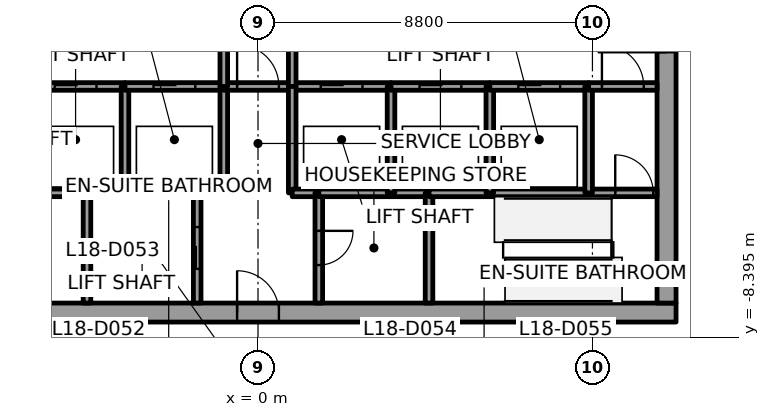
"""IFC4 building model, lengths in metres.
Left out: names, types, materials, properties, quantities, classifications, styles, units other than length and angle.
Written with IfcOpenShell. Run it as: python <this file> out.ifc"""

import sys

from ifc_helpers import new_model, si_unit, direction, frame, frame_2d, origin, place, context, subcontext, project, spatial, rectangle, extrude, element, fill, save


model = new_model("IFC4")
c1 = context("Model", 3, precision=1e-05, world=origin(), true_north=direction((0.0, 1.0)))
c2 = subcontext(c1, "Body", "Model", "MODEL_VIEW")
j1 = project(units=[si_unit("LENGTHUNIT", "METRE"), si_unit("PLANEANGLEUNIT", "RADIAN")], contexts=[c1])
p1 = place(None, origin())
s1 = spatial("IfcSite", under=j1, at=p1, CompositionType="ELEMENT")
p2 = place(p1, origin())
s2 = spatial("IfcBuilding", under=s1, at=p2, CompositionType="ELEMENT")
p3 = place(p2, frame((0.0, 0.0, 88.7)))
s3 = spatial("IfcBuildingStorey", under=s2, at=p3, CompositionType="ELEMENT", Elevation=88.7)
p4 = place(p3, frame((-11.0, -7.75, 0.0), z_axis=(0.0, 0.0, 1.0), x_axis=(1.0, 0.0, 0.0)))
e1 = element("IfcWall", 1, at=p4, inside=s3, PredefinedType="SHEAR", context=c2, shape_type="SweptSolid", body=[
    extrude(rectangle(XDim=22.0, YDim=0.5, at=frame_2d((11.0, 0.0))), origin(), (0.0, 0.0, 1.0), 3.7),
])
p5 = place(p4, frame((10.45, 0.0, 0.0)))
e2 = element("IfcOpeningElement", 2, at=p5, cuts=e1, PredefinedType="OPENING", context=c2, shape_type="SweptSolid", body=[
    extrude(rectangle(XDim=1.1, YDim=2.1, at=frame_2d((0.55, 1.05))), frame((0.0, 0.25, 0.0), z_axis=(0.0, -1.0, 0.0), x_axis=(1.0, 0.0, 0.0)), (0.0, 0.0, 1.0), 0.5),
])
p6 = place(p3, frame((10.75, -7.5, 0.0), z_axis=(0.0, 0.0, 1.0), x_axis=(0.0, 1.0, 0.0)))
e3 = element("IfcWall", 3, at=p6, inside=s3, PredefinedType="SHEAR", context=c2, shape_type="SweptSolid", body=[
    extrude(rectangle(XDim=15.0, YDim=0.5, at=frame_2d((7.5, 0.0))), origin(), (0.0, 0.0, 1.0), 3.7),
])
p7 = place(p6, frame((6.6, 0.0, 0.0)))
e4 = element("IfcOpeningElement", 4, at=p7, cuts=e3, PredefinedType="OPENING", context=c2, shape_type="SweptSolid", body=[
    extrude(rectangle(XDim=1.8, YDim=2.1, at=frame_2d((0.9, 1.05))), frame((0.0, 0.25, 0.0), z_axis=(0.0, -1.0, 0.0), x_axis=(1.0, 0.0, 0.0)), (0.0, 0.0, 1.0), 0.5),
])
p8 = place(p3, frame((-6.1, -4.6, 0.0), z_axis=(0.0, 0.0, 1.0), x_axis=(1.0, 0.0, 0.0)))
e5 = element("IfcWall", 5, at=p8, inside=s3, PredefinedType="SOLIDWALL", context=c2, shape_type="SweptSolid", body=[
    extrude(rectangle(XDim=1.6, YDim=0.2, at=frame_2d((0.8, 0.0))), origin(), (0.0, 0.0, 1.0), 3.55),
])
p9 = place(p3, frame((-6.1, -1.8, 0.0), z_axis=(0.0, 0.0, 1.0), x_axis=(1.0, 0.0, 0.0)))
e6 = element("IfcWall", 6, at=p9, inside=s3, PredefinedType="SOLIDWALL", context=c2, shape_type="SweptSolid", body=[
    extrude(rectangle(XDim=2.6, YDim=0.2, at=frame_2d((1.3, 0.0))), origin(), (0.0, 0.0, 1.0), 3.55),
])
p10 = place(p9, frame((0.75, 0.0, 0.0)))
e7 = element("IfcOpeningElement", 7, at=p10, cuts=e6, PredefinedType="OPENING", context=c2, shape_type="SweptSolid", body=[
    extrude(rectangle(XDim=1.1, YDim=2.1, at=frame_2d((0.55, 1.05))), frame((0.0, 0.1, 0.0), z_axis=(0.0, -1.0, 0.0), x_axis=(1.0, 0.0, 0.0)), (0.0, 0.0, 1.0), 0.2),
])
p11 = place(p3, frame((-4.5, -4.6, 0.0), z_axis=(0.0, 0.0, 1.0), x_axis=(0.0, -1.0, 0.0)))
e8 = element("IfcWall", 8, at=p11, inside=s3, PredefinedType="SOLIDWALL", context=c2, shape_type="SweptSolid", body=[
    extrude(rectangle(XDim=2.9, YDim=0.2, at=frame_2d((1.45, 0.0))), origin(), (0.0, 0.0, 1.0), 3.55),
])
p12 = place(p3, frame((-4.5, -4.6, 0.0), z_axis=(0.0, 0.0, 1.0), x_axis=(1.0, 0.0, 0.0)))
e9 = element("IfcWall", 9, at=p12, inside=s3, PredefinedType="SOLIDWALL", context=c2, shape_type="SweptSolid", body=[
    extrude(rectangle(XDim=1.0, YDim=0.2, at=frame_2d((0.5, 0.0))), origin(), (0.0, 0.0, 1.0), 3.55),
])
p13 = place(p3, frame((-3.5, -4.6, 0.0), z_axis=(0.0, 0.0, 1.0), x_axis=(1.0, 0.0, 0.0)))
e10 = element("IfcWall", 10, at=p13, inside=s3, PredefinedType="SOLIDWALL", context=c2, shape_type="SweptSolid", body=[
    extrude(rectangle(XDim=1.9, YDim=0.2, at=frame_2d((0.95, 0.0))), origin(), (0.0, 0.0, 1.0), 3.55),
])
p14 = place(p3, frame((-3.5, -4.6, 0.0), z_axis=(0.0, 0.0, 1.0), x_axis=(0.0, 1.0, 0.0)))
e11 = element("IfcWall", 11, at=p14, inside=s3, PredefinedType="SOLIDWALL", context=c2, shape_type="SweptSolid", body=[
    extrude(rectangle(XDim=2.8, YDim=0.2, at=frame_2d((1.4, 0.0))), origin(), (0.0, 0.0, 1.0), 3.55),
])
p15 = place(p3, frame((-3.5, -1.8, 0.0), z_axis=(0.0, 0.0, 1.0), x_axis=(1.0, 0.0, 0.0)))
e12 = element("IfcWall", 12, at=p15, inside=s3, PredefinedType="SOLIDWALL", context=c2, shape_type="SweptSolid", body=[
    extrude(rectangle(XDim=2.6, YDim=0.2, at=frame_2d((1.3, 0.0))), origin(), (0.0, 0.0, 1.0), 3.55),
])
p16 = place(p15, frame((0.75, 0.0, 0.0)))
e13 = element("IfcOpeningElement", 13, at=p16, cuts=e12, PredefinedType="OPENING", context=c2, shape_type="SweptSolid", body=[
    extrude(rectangle(XDim=1.1, YDim=2.1, at=frame_2d((0.55, 1.05))), frame((0.0, 0.1, 0.0), z_axis=(0.0, -1.0, 0.0), x_axis=(1.0, 0.0, 0.0)), (0.0, 0.0, 1.0), 0.2),
])
p17 = place(p3, frame((-1.6, -7.5, 0.0), z_axis=(0.0, 0.0, 1.0), x_axis=(0.0, 1.0, 0.0)))
e14 = element("IfcWall", 14, at=p17, inside=s3, PredefinedType="SOLIDWALL", context=c2, shape_type="SweptSolid", body=[
    extrude(rectangle(XDim=2.9, YDim=0.2, at=frame_2d((1.45, 0.0))), origin(), (0.0, 0.0, 1.0), 3.55),
])
p18 = place(p17, frame((0.9, 0.0, 0.0)))
e15 = element("IfcOpeningElement", 15, at=p18, cuts=e14, PredefinedType="OPENING", context=c2, shape_type="SweptSolid", body=[
    extrude(rectangle(XDim=1.1, YDim=2.1, at=frame_2d((0.55, 1.05))), frame((0.0, 0.1, 0.0), z_axis=(0.0, -1.0, 0.0), x_axis=(1.0, 0.0, 0.0)), (0.0, 0.0, 1.0), 0.2),
])
p19 = place(p3, frame((-1.6, -4.6, 0.0), z_axis=(0.0, 0.0, 1.0), x_axis=(1.0, 0.0, 0.0)))
e16 = element("IfcWall", 16, at=p19, inside=s3, PredefinedType="SOLIDWALL", context=c2, shape_type="SweptSolid", body=[
    extrude(rectangle(XDim=0.7, YDim=0.2, at=frame_2d((0.35, 0.0))), origin(), (0.0, 0.0, 1.0), 3.55),
])
p20 = place(p3, frame((-0.9, -4.6, 0.0), z_axis=(0.0, 0.0, 1.0), x_axis=(0.0, 1.0, 0.0)))
e17 = element("IfcWall", 17, at=p20, inside=s3, PredefinedType="SOLIDWALL", context=c2, shape_type="SweptSolid", body=[
    extrude(rectangle(XDim=2.8, YDim=0.2, at=frame_2d((1.4, 0.0))), origin(), (0.0, 0.0, 1.0), 3.55),
])
p21 = place(p3, frame((-0.9, -1.8, 0.0), z_axis=(0.0, 0.0, 1.0), x_axis=(1.0, 0.0, 0.0)))
e18 = element("IfcWall", 18, at=p21, inside=s3, PredefinedType="SOLIDWALL", context=c2, shape_type="SweptSolid", body=[
    extrude(rectangle(XDim=1.8, YDim=0.2, at=frame_2d((0.9, 0.0))), origin(), (0.0, 0.0, 1.0), 3.55),
])
p22 = place(p21, frame((0.35, 0.0, 0.0)))
e19 = element("IfcOpeningElement", 19, at=p22, cuts=e18, PredefinedType="OPENING", context=c2, shape_type="SweptSolid", body=[
    extrude(rectangle(XDim=1.1, YDim=2.1, at=frame_2d((0.55, 1.05))), frame((0.0, 0.1, 0.0), z_axis=(0.0, -1.0, 0.0), x_axis=(1.0, 0.0, 0.0)), (0.0, 0.0, 1.0), 0.2),
])
p23 = place(p3, frame((-0.9, 1.8, 0.0), z_axis=(0.0, 0.0, 1.0), x_axis=(0.0, -1.0, 0.0)))
e20 = element("IfcWall", 20, at=p23, inside=s3, PredefinedType="SOLIDWALL", context=c2, shape_type="SweptSolid", body=[
    extrude(rectangle(XDim=3.6, YDim=0.2, at=frame_2d((1.8, 0.0))), origin(), (0.0, 0.0, 1.0), 3.55),
])
p24 = place(p23, frame((1.05, 0.0, 0.0)))
e21 = element("IfcOpeningElement", 21, at=p24, cuts=e20, PredefinedType="OPENING", context=c2, shape_type="SweptSolid", body=[
    extrude(rectangle(XDim=1.5, YDim=2.1, at=frame_2d((0.75, 1.05))), frame((0.0, 0.1, 0.0), z_axis=(0.0, -1.0, 0.0), x_axis=(1.0, 0.0, 0.0)), (0.0, 0.0, 1.0), 0.2),
])
p25 = place(p3, frame((0.9, -1.8, 0.0), z_axis=(0.0, 0.0, 1.0), x_axis=(1.0, 0.0, 0.0)))
e22 = element("IfcWall", 22, at=p25, inside=s3, PredefinedType="SOLIDWALL", context=c2, shape_type="SweptSolid", body=[
    extrude(rectangle(XDim=2.6, YDim=0.2, at=frame_2d((1.3, 0.0))), origin(), (0.0, 0.0, 1.0), 3.55),
])
p26 = place(p25, frame((0.75, 0.0, 0.0)))
e23 = element("IfcOpeningElement", 23, at=p26, cuts=e22, PredefinedType="OPENING", context=c2, shape_type="SweptSolid", body=[
    extrude(rectangle(XDim=1.1, YDim=2.1, at=frame_2d((0.55, 1.05))), frame((0.0, 0.1, 0.0), z_axis=(0.0, -1.0, 0.0), x_axis=(1.0, 0.0, 0.0)), (0.0, 0.0, 1.0), 0.2),
])
p27 = place(p3, frame((0.9, -1.8, 0.0), z_axis=(0.0, 0.0, 1.0), x_axis=(0.0, 1.0, 0.0)))
e24 = element("IfcWall", 24, at=p27, inside=s3, PredefinedType="SOLIDWALL", context=c2, shape_type="SweptSolid", body=[
    extrude(rectangle(XDim=3.6, YDim=0.2, at=frame_2d((1.8, 0.0))), origin(), (0.0, 0.0, 1.0), 3.55),
])
p28 = place(p27, frame((1.05, 0.0, 0.0)))
e25 = element("IfcOpeningElement", 25, at=p28, cuts=e24, PredefinedType="OPENING", context=c2, shape_type="SweptSolid", body=[
    extrude(rectangle(XDim=1.5, YDim=2.1, at=frame_2d((0.75, 1.05))), frame((0.0, 0.1, 0.0), z_axis=(0.0, -1.0, 0.0), x_axis=(1.0, 0.0, 0.0)), (0.0, 0.0, 1.0), 0.2),
])
p29 = place(p3, frame((0.9, -1.8, 0.0), z_axis=(0.0, 0.0, 1.0), x_axis=(0.0, -1.0, 0.0)))
e26 = element("IfcWall", 26, at=p29, inside=s3, PredefinedType="SOLIDWALL", context=c2, shape_type="SweptSolid", body=[
    extrude(rectangle(XDim=2.8, YDim=0.2, at=frame_2d((1.4, 0.0))), origin(), (0.0, 0.0, 1.0), 3.55),
])
p30 = place(p3, frame((0.9, -4.6, 0.0), z_axis=(0.0, 0.0, 1.0), x_axis=(1.0, 0.0, 0.0)))
e27 = element("IfcWall", 27, at=p30, inside=s3, PredefinedType="SOLIDWALL", context=c2, shape_type="SweptSolid", body=[
    extrude(rectangle(XDim=0.7, YDim=0.2, at=frame_2d((0.35, 0.0))), origin(), (0.0, 0.0, 1.0), 3.55),
])
p31 = place(p3, frame((1.6, -4.6, 0.0), z_axis=(0.0, 0.0, 1.0), x_axis=(0.0, -1.0, 0.0)))
e28 = element("IfcWall", 28, at=p31, inside=s3, PredefinedType="SOLIDWALL", context=c2, shape_type="SweptSolid", body=[
    extrude(rectangle(XDim=2.9, YDim=0.2, at=frame_2d((1.45, 0.0))), origin(), (0.0, 0.0, 1.0), 3.55),
])
p32 = place(p31, frame((1.0, 0.0, 0.0)))
e29 = element("IfcOpeningElement", 29, at=p32, cuts=e28, PredefinedType="OPENING", context=c2, shape_type="SweptSolid", body=[
    extrude(rectangle(XDim=0.9, YDim=2.1, at=frame_2d((0.45, 1.05))), frame((0.0, 0.1, 0.0), z_axis=(0.0, -1.0, 0.0), x_axis=(1.0, 0.0, 0.0)), (0.0, 0.0, 1.0), 0.2),
])
p33 = place(p3, frame((3.5, -4.6, 0.0), z_axis=(0.0, 0.0, 1.0), x_axis=(-1.0, 0.0, 0.0)))
e30 = element("IfcWall", 30, at=p33, inside=s3, PredefinedType="SOLIDWALL", context=c2, shape_type="SweptSolid", body=[
    extrude(rectangle(XDim=1.9, YDim=0.2, at=frame_2d((0.95, 0.0))), origin(), (0.0, 0.0, 1.0), 3.55),
])
p34 = place(p3, frame((4.5, -4.6, 0.0), z_axis=(0.0, 0.0, 1.0), x_axis=(-1.0, 0.0, 0.0)))
e31 = element("IfcWall", 31, at=p34, inside=s3, PredefinedType="SOLIDWALL", context=c2, shape_type="SweptSolid", body=[
    extrude(rectangle(XDim=1.0, YDim=0.2, at=frame_2d((0.5, 0.0))), origin(), (0.0, 0.0, 1.0), 3.55),
])
p35 = place(p3, frame((3.5, -4.6, 0.0), z_axis=(0.0, 0.0, 1.0), x_axis=(0.0, 1.0, 0.0)))
e32 = element("IfcWall", 32, at=p35, inside=s3, PredefinedType="SOLIDWALL", context=c2, shape_type="SweptSolid", body=[
    extrude(rectangle(XDim=2.8, YDim=0.2, at=frame_2d((1.4, 0.0))), origin(), (0.0, 0.0, 1.0), 3.55),
])
p36 = place(p3, frame((3.5, -1.8, 0.0), z_axis=(0.0, 0.0, 1.0), x_axis=(1.0, 0.0, 0.0)))
e33 = element("IfcWall", 33, at=p36, inside=s3, PredefinedType="SOLIDWALL", context=c2, shape_type="SweptSolid", body=[
    extrude(rectangle(XDim=2.6, YDim=0.2, at=frame_2d((1.3, 0.0))), origin(), (0.0, 0.0, 1.0), 3.55),
])
p37 = place(p36, frame((0.75, 0.0, 0.0)))
e34 = element("IfcOpeningElement", 34, at=p37, cuts=e33, PredefinedType="OPENING", context=c2, shape_type="SweptSolid", body=[
    extrude(rectangle(XDim=1.1, YDim=2.1, at=frame_2d((0.55, 1.05))), frame((0.0, 0.1, 0.0), z_axis=(0.0, -1.0, 0.0), x_axis=(1.0, 0.0, 0.0)), (0.0, 0.0, 1.0), 0.2),
])
p38 = place(p3, frame((4.5, -7.5, 0.0), z_axis=(0.0, 0.0, 1.0), x_axis=(0.0, 1.0, 0.0)))
e35 = element("IfcWall", 35, at=p38, inside=s3, PredefinedType="SOLIDWALL", context=c2, shape_type="SweptSolid", body=[
    extrude(rectangle(XDim=2.9, YDim=0.2, at=frame_2d((1.45, 0.0))), origin(), (0.0, 0.0, 1.0), 3.55),
])
p39 = place(p3, frame((4.5, -4.6, 0.0), z_axis=(0.0, 0.0, 1.0), x_axis=(1.0, 0.0, 0.0)))
e36 = element("IfcWall", 36, at=p39, inside=s3, PredefinedType="SOLIDWALL", context=c2, shape_type="SweptSolid", body=[
    extrude(rectangle(XDim=1.6, YDim=0.2, at=frame_2d((0.8, 0.0))), origin(), (0.0, 0.0, 1.0), 3.55),
])
p40 = place(p3, frame((6.1, -4.6, 0.0), z_axis=(0.0, 0.0, 1.0), x_axis=(1.0, 0.0, 0.0)))
e37 = element("IfcWall", 37, at=p40, inside=s3, PredefinedType="SOLIDWALL", context=c2, shape_type="SweptSolid", body=[
    extrude(rectangle(XDim=2.6, YDim=0.2, at=frame_2d((1.3, 0.0))), origin(), (0.0, 0.0, 1.0), 3.55),
])
p41 = place(p3, frame((6.1, -4.6, 0.0), z_axis=(0.0, 0.0, 1.0), x_axis=(0.0, 1.0, 0.0)))
e38 = element("IfcWall", 38, at=p41, inside=s3, PredefinedType="SOLIDWALL", context=c2, shape_type="SweptSolid", body=[
    extrude(rectangle(XDim=2.8, YDim=0.2, at=frame_2d((1.4, 0.0))), origin(), (0.0, 0.0, 1.0), 3.55),
])
p42 = place(p3, frame((6.1, -1.8, 0.0), z_axis=(0.0, 0.0, 1.0), x_axis=(1.0, 0.0, 0.0)))
e39 = element("IfcWall", 39, at=p42, inside=s3, PredefinedType="SOLIDWALL", context=c2, shape_type="SweptSolid", body=[
    extrude(rectangle(XDim=2.6, YDim=0.2, at=frame_2d((1.3, 0.0))), origin(), (0.0, 0.0, 1.0), 3.55),
])
p43 = place(p42, frame((0.75, 0.0, 0.0)))
e40 = element("IfcOpeningElement", 40, at=p43, cuts=e39, PredefinedType="OPENING", context=c2, shape_type="SweptSolid", body=[
    extrude(rectangle(XDim=1.1, YDim=2.1, at=frame_2d((0.55, 1.05))), frame((0.0, 0.1, 0.0), z_axis=(0.0, -1.0, 0.0), x_axis=(1.0, 0.0, 0.0)), (0.0, 0.0, 1.0), 0.2),
])
p44 = place(p3, frame((8.7, -4.6, 0.0), z_axis=(0.0, 0.0, 1.0), x_axis=(1.0, 0.0, 0.0)))
e41 = element("IfcWall", 41, at=p44, inside=s3, PredefinedType="SOLIDWALL", context=c2, shape_type="SweptSolid", body=[
    extrude(rectangle(XDim=1.8, YDim=0.2, at=frame_2d((0.9, 0.0))), origin(), (0.0, 0.0, 1.0), 3.55),
])
p45 = place(p44, frame((0.7, 0.0, 0.0)))
e42 = element("IfcOpeningElement", 42, at=p45, cuts=e41, PredefinedType="OPENING", context=c2, shape_type="SweptSolid", body=[
    extrude(rectangle(XDim=1.0, YDim=2.1, at=frame_2d((0.5, 1.05))), frame((0.0, 0.1, 0.0), z_axis=(0.0, -1.0, 0.0), x_axis=(1.0, 0.0, 0.0)), (0.0, 0.0, 1.0), 0.2),
])
p46 = place(p3, frame((8.7, -1.8, 0.0), z_axis=(0.0, 0.0, 1.0), x_axis=(0.0, -1.0, 0.0)))
e43 = element("IfcWall", 43, at=p46, inside=s3, PredefinedType="SOLIDWALL", context=c2, shape_type="SweptSolid", body=[
    extrude(rectangle(XDim=2.8, YDim=0.2, at=frame_2d((1.4, 0.0))), origin(), (0.0, 0.0, 1.0), 3.55),
])
p47 = place(p3, frame((8.7, -1.8, 0.0), z_axis=(0.0, 0.0, 1.0), x_axis=(1.0, 0.0, 0.0)))
e44 = element("IfcWall", 44, at=p47, inside=s3, PredefinedType="SOLIDWALL", context=c2, shape_type="SweptSolid", body=[
    extrude(rectangle(XDim=1.8, YDim=0.2, at=frame_2d((0.9, 0.0))), origin(), (0.0, 0.0, 1.0), 3.55),
])
p48 = place(p47, frame((0.35, 0.0, 0.0)))
e45 = element("IfcOpeningElement", 45, at=p48, cuts=e44, PredefinedType="OPENING", context=c2, shape_type="SweptSolid", body=[
    extrude(rectangle(XDim=1.1, YDim=2.1, at=frame_2d((0.55, 1.05))), frame((0.0, 0.1, 0.0), z_axis=(0.0, -1.0, 0.0), x_axis=(1.0, 0.0, 0.0)), (0.0, 0.0, 1.0), 0.2),
])
p49 = place(p10, origin())
e46 = element("IfcDoor", 46, at=p49, inside=s3, OperationType="SLIDING_TO_RIGHT", PredefinedType="DOOR", context=c2, shape_type="SweptSolid", body=[
    extrude(rectangle(XDim=1.1, YDim=2.1, at=frame_2d((0.55, 1.05))), frame((0.0, 0.025, 0.0), z_axis=(0.0, -1.0, 0.0), x_axis=(1.0, 0.0, 0.0)), (0.0, 0.0, 1.0), 0.05),
])
fill(e7, e46)
p50 = place(p16, origin())
e47 = element("IfcDoor", 47, at=p50, inside=s3, OperationType="SLIDING_TO_RIGHT", PredefinedType="DOOR", context=c2, shape_type="SweptSolid", body=[
    extrude(rectangle(XDim=1.1, YDim=2.1, at=frame_2d((0.55, 1.05))), frame((0.0, 0.025, 0.0), z_axis=(0.0, -1.0, 0.0), x_axis=(1.0, 0.0, 0.0)), (0.0, 0.0, 1.0), 0.05),
])
fill(e13, e47)
p51 = place(p26, origin())
e48 = element("IfcDoor", 48, at=p51, inside=s3, OperationType="SLIDING_TO_RIGHT", PredefinedType="DOOR", context=c2, shape_type="SweptSolid", body=[
    extrude(rectangle(XDim=1.1, YDim=2.1, at=frame_2d((0.55, 1.05))), frame((0.0, 0.025, 0.0), z_axis=(0.0, -1.0, 0.0), x_axis=(1.0, 0.0, 0.0)), (0.0, 0.0, 1.0), 0.05),
])
fill(e23, e48)
p52 = place(p37, origin())
e49 = element("IfcDoor", 49, at=p52, inside=s3, OperationType="SLIDING_TO_LEFT", PredefinedType="DOOR", context=c2, shape_type="SweptSolid", body=[
    extrude(rectangle(XDim=1.1, YDim=2.1, at=frame_2d((0.55, 1.05))), frame((0.0, 0.025, 0.0), z_axis=(0.0, -1.0, 0.0), x_axis=(1.0, 0.0, 0.0)), (0.0, 0.0, 1.0), 0.05),
])
fill(e34, e49)
p53 = place(p43, origin())
e50 = element("IfcDoor", 50, at=p53, inside=s3, OperationType="SLIDING_TO_LEFT", PredefinedType="DOOR", context=c2, shape_type="SweptSolid", body=[
    extrude(rectangle(XDim=1.1, YDim=2.1, at=frame_2d((0.55, 1.05))), frame((0.0, 0.025, 0.0), z_axis=(0.0, -1.0, 0.0), x_axis=(1.0, 0.0, 0.0)), (0.0, 0.0, 1.0), 0.05),
])
fill(e40, e50)
p54 = place(p18, origin())
e51 = element("IfcDoor", 51, at=p54, inside=s3, OperationType="SLIDING_TO_RIGHT", PredefinedType="DOOR", context=c2, shape_type="SweptSolid", body=[
    extrude(rectangle(XDim=1.1, YDim=2.1, at=frame_2d((0.55, 1.05))), frame((0.0, 0.025, 0.0), z_axis=(0.0, -1.0, 0.0), x_axis=(1.0, 0.0, 0.0)), (0.0, 0.0, 1.0), 0.05),
])
fill(e15, e51)
p55 = place(p48, origin())
e52 = element("IfcDoor", 52, at=p55, inside=s3, OperationType="SINGLE_SWING_RIGHT", PredefinedType="DOOR", context=c2, shape_type="SweptSolid", body=[
    extrude(rectangle(XDim=1.1, YDim=2.1, at=frame_2d((0.55, 1.05))), frame((0.0, 0.025, 0.0), z_axis=(0.0, -1.0, 0.0), x_axis=(1.0, 0.0, 0.0)), (0.0, 0.0, 1.0), 0.05),
])
fill(e45, e52)
p56 = place(p22, origin())
e53 = element("IfcDoor", 53, at=p56, inside=s3, OperationType="SINGLE_SWING_RIGHT", PredefinedType="DOOR", context=c2, shape_type="SweptSolid", body=[
    extrude(rectangle(XDim=1.1, YDim=2.1, at=frame_2d((0.55, 1.05))), frame((0.0, 0.025, 0.0), z_axis=(0.0, -1.0, 0.0), x_axis=(1.0, 0.0, 0.0)), (0.0, 0.0, 1.0), 0.05),
])
fill(e19, e53)
p57 = place(p45, origin())
e54 = element("IfcDoor", 54, at=p57, inside=s3, OperationType="SINGLE_SWING_RIGHT", PredefinedType="DOOR", context=c2, shape_type="SweptSolid", body=[
    extrude(rectangle(XDim=1.0, YDim=2.1, at=frame_2d((0.5, 1.05))), frame((0.0, 0.025, 0.0), z_axis=(0.0, -1.0, 0.0), x_axis=(1.0, 0.0, 0.0)), (0.0, 0.0, 1.0), 0.05),
])
fill(e42, e54)
p58 = place(p32, origin())
e55 = element("IfcDoor", 55, at=p58, inside=s3, OperationType="SINGLE_SWING_RIGHT", PredefinedType="DOOR", context=c2, shape_type="SweptSolid", body=[
    extrude(rectangle(XDim=0.9, YDim=2.1, at=frame_2d((0.45, 1.05))), frame((0.0, 0.025, 0.0), z_axis=(0.0, -1.0, 0.0), x_axis=(1.0, 0.0, 0.0)), (0.0, 0.0, 1.0), 0.05),
])
fill(e29, e55)
p59 = place(p7, origin())
e56 = element("IfcDoor", 56, at=p59, inside=s3, OperationType="DOUBLE_DOOR_SINGLE_SWING", PredefinedType="DOOR", context=c2, shape_type="SweptSolid", body=[
    extrude(rectangle(XDim=1.8, YDim=2.1, at=frame_2d((0.9, 1.05))), frame((0.0, 0.025, 0.0), z_axis=(0.0, -1.0, 0.0), x_axis=(1.0, 0.0, 0.0)), (0.0, 0.0, 1.0), 0.05),
])
fill(e4, e56)
p60 = place(p5, origin())
e57 = element("IfcDoor", 57, at=p60, inside=s3, OperationType="SINGLE_SWING_LEFT", PredefinedType="DOOR", context=c2, shape_type="SweptSolid", body=[
    extrude(rectangle(XDim=1.1, YDim=2.1, at=frame_2d((0.55, 1.05))), frame((0.0, 0.025, 0.0), z_axis=(0.0, -1.0, 0.0), x_axis=(1.0, 0.0, 0.0)), (0.0, 0.0, 1.0), 0.05),
])
fill(e2, e57)
save(model, sys.argv[1])
